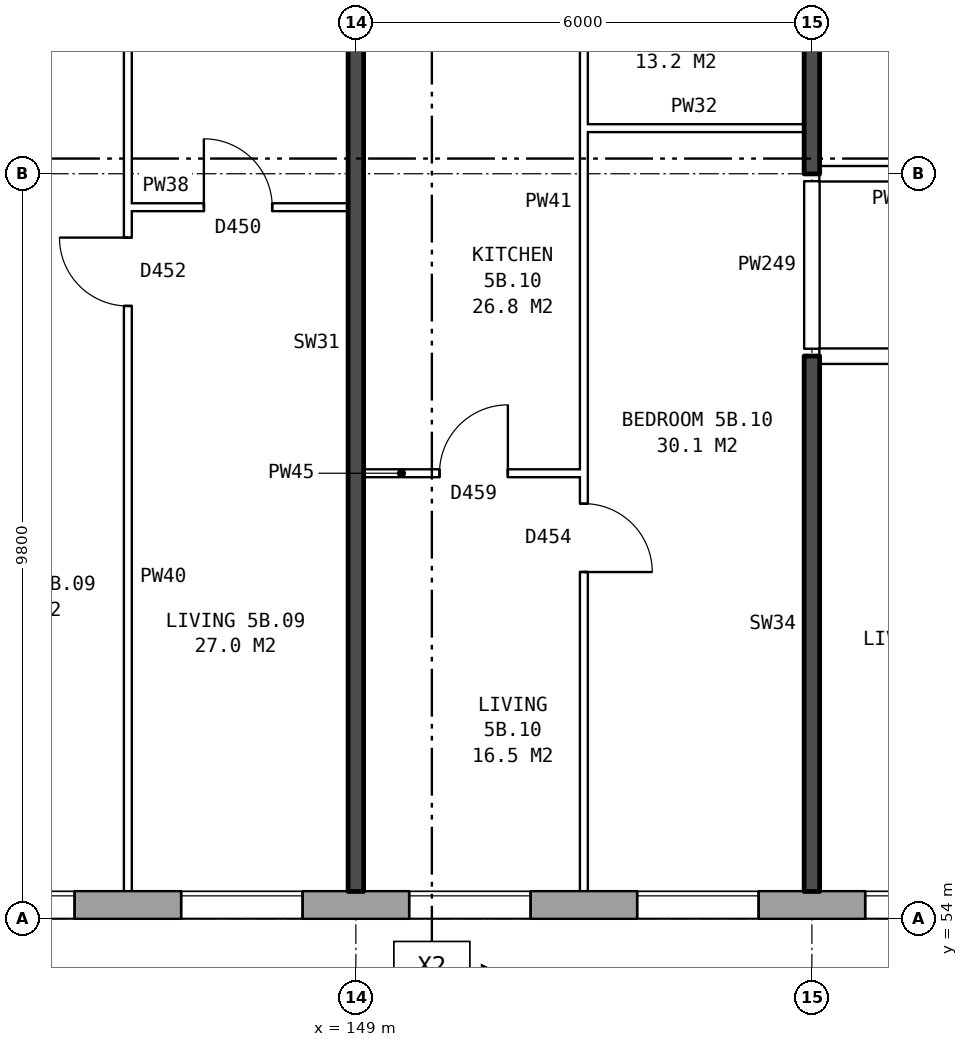
"""IFC4 building model, lengths in metres.
Left out: names, types, materials, properties, quantities, classifications, styles, units other than length and angle.
Written with IfcOpenShell. Run it as: python <this file> out.ifc"""

import sys

from ifc_helpers import new_model, si_unit, direction, frame, frame_2d, origin, place, context, subcontext, project, spatial, rectangle, extrude, element, fill, save


model = new_model("IFC4")
c1 = context("Model", 3, precision=1e-05, world=origin(), true_north=direction((0.0, 1.0)))
c2 = subcontext(c1, "Body", "Model", "MODEL_VIEW")
j1 = project(units=[si_unit("LENGTHUNIT", "METRE"), si_unit("PLANEANGLEUNIT", "RADIAN")], contexts=[c1])
p1 = place(None, origin())
s1 = spatial("IfcSite", under=j1, at=p1, CompositionType="ELEMENT")
p2 = place(p1, origin())
s2 = spatial("IfcBuilding", under=s1, at=p2, CompositionType="ELEMENT")
p3 = place(p2, frame((0.0, 0.0, 22.6)))
s3 = spatial("IfcBuildingStorey", under=s2, at=p3, CompositionType="ELEMENT", Elevation=22.6)
p4 = place(p3, frame((134.075, 54.18, 0.0), z_axis=(0.0, 0.0, 1.0), x_axis=(1.0, 0.0, 0.0)))
e1 = element("IfcWall", 1, at=p4, inside=s3, PredefinedType="STANDARD", context=c2, shape_type="SweptSolid", body=[
    extrude(rectangle(XDim=40.601, YDim=0.36, at=frame_2d((20.3, 0.0))), origin(), (0.0, 0.0, 1.0), 2.85),
])
p5 = place(p4, frame((0.3, 0.0, 0.8)))
e2 = element("IfcOpeningElement", 2, at=p5, cuts=e1, PredefinedType="OPENING", context=c2, shape_type="SweptSolid", body=[
    extrude(rectangle(XDim=1.4, YDim=1.8, at=frame_2d((0.7, 0.9))), frame((0.0, 0.19, 0.0), z_axis=(0.0, -1.0, 0.0), x_axis=(1.0, 0.0, 0.0)), (0.0, 0.0, 1.0), 0.38),
])
p6 = place(p4, frame((4.125, 0.0, 0.8)))
e3 = element("IfcOpeningElement", 3, at=p6, cuts=e1, PredefinedType="OPENING", context=c2, shape_type="SweptSolid", body=[
    extrude(rectangle(XDim=0.8, YDim=0.9, at=frame_2d((0.4, 0.45))), frame((0.0, 0.19, 0.0), z_axis=(0.0, -1.0, 0.0), x_axis=(1.0, 0.0, 0.0)), (0.0, 0.0, 1.0), 0.38),
])
p7 = place(p4, frame((6.625, 0.0, 0.8)))
e4 = element("IfcOpeningElement", 4, at=p7, cuts=e1, PredefinedType="OPENING", context=c2, shape_type="SweptSolid", body=[
    extrude(rectangle(XDim=1.6, YDim=1.8, at=frame_2d((0.8, 0.9))), frame((0.0, 0.19, 0.0), z_axis=(0.0, -1.0, 0.0), x_axis=(1.0, 0.0, 0.0)), (0.0, 0.0, 1.0), 0.38),
])
p8 = place(p4, frame((9.625, 0.0, 0.8)))
e5 = element("IfcOpeningElement", 5, at=p8, cuts=e1, PredefinedType="OPENING", context=c2, shape_type="SweptSolid", body=[
    extrude(rectangle(XDim=1.6, YDim=1.8, at=frame_2d((0.8, 0.9))), frame((0.0, 0.19, 0.0), z_axis=(0.0, -1.0, 0.0), x_axis=(1.0, 0.0, 0.0)), (0.0, 0.0, 1.0), 0.38),
])
p9 = place(p4, frame((12.625, 0.0, 0.8)))
e6 = element("IfcOpeningElement", 6, at=p9, cuts=e1, PredefinedType="OPENING", context=c2, shape_type="SweptSolid", body=[
    extrude(rectangle(XDim=1.6, YDim=1.8, at=frame_2d((0.8, 0.9))), frame((0.0, 0.19, 0.0), z_axis=(0.0, -1.0, 0.0), x_axis=(1.0, 0.0, 0.0)), (0.0, 0.0, 1.0), 0.38),
])
p10 = place(p4, frame((15.625, 0.0, 0.8)))
e7 = element("IfcOpeningElement", 7, at=p10, cuts=e1, PredefinedType="OPENING", context=c2, shape_type="SweptSolid", body=[
    extrude(rectangle(XDim=1.6, YDim=1.8, at=frame_2d((0.8, 0.9))), frame((0.0, 0.19, 0.0), z_axis=(0.0, -1.0, 0.0), x_axis=(1.0, 0.0, 0.0)), (0.0, 0.0, 1.0), 0.38),
])
p11 = place(p4, frame((18.625, 0.0, 0.8)))
e8 = element("IfcOpeningElement", 8, at=p11, cuts=e1, PredefinedType="OPENING", context=c2, shape_type="SweptSolid", body=[
    extrude(rectangle(XDim=1.6, YDim=1.8, at=frame_2d((0.8, 0.9))), frame((0.0, 0.19, 0.0), z_axis=(0.0, -1.0, 0.0), x_axis=(1.0, 0.0, 0.0)), (0.0, 0.0, 1.0), 0.38),
])
p12 = place(p4, frame((21.625, 0.0, 0.8)))
e9 = element("IfcOpeningElement", 9, at=p12, cuts=e1, PredefinedType="OPENING", context=c2, shape_type="SweptSolid", body=[
    extrude(rectangle(XDim=1.6, YDim=1.8, at=frame_2d((0.8, 0.9))), frame((0.0, 0.19, 0.0), z_axis=(0.0, -1.0, 0.0), x_axis=(1.0, 0.0, 0.0)), (0.0, 0.0, 1.0), 0.38),
])
p13 = place(p4, frame((24.625, 0.0, 0.8)))
e10 = element("IfcOpeningElement", 10, at=p13, cuts=e1, PredefinedType="OPENING", context=c2, shape_type="SweptSolid", body=[
    extrude(rectangle(XDim=1.6, YDim=1.8, at=frame_2d((0.8, 0.9))), frame((0.0, 0.19, 0.0), z_axis=(0.0, -1.0, 0.0), x_axis=(1.0, 0.0, 0.0)), (0.0, 0.0, 1.0), 0.38),
])
p14 = place(p4, frame((27.625, 0.0, 0.8)))
e11 = element("IfcOpeningElement", 11, at=p14, cuts=e1, PredefinedType="OPENING", context=c2, shape_type="SweptSolid", body=[
    extrude(rectangle(XDim=1.6, YDim=1.8, at=frame_2d((0.8, 0.9))), frame((0.0, 0.19, 0.0), z_axis=(0.0, -1.0, 0.0), x_axis=(1.0, 0.0, 0.0)), (0.0, 0.0, 1.0), 0.38),
])
p15 = place(p4, frame((30.625, 0.0, 0.8)))
e12 = element("IfcOpeningElement", 12, at=p15, cuts=e1, PredefinedType="OPENING", context=c2, shape_type="SweptSolid", body=[
    extrude(rectangle(XDim=1.6, YDim=1.8, at=frame_2d((0.8, 0.9))), frame((0.0, 0.19, 0.0), z_axis=(0.0, -1.0, 0.0), x_axis=(1.0, 0.0, 0.0)), (0.0, 0.0, 1.0), 0.38),
])
p16 = place(p4, frame((33.625, 0.0, 0.8)))
e13 = element("IfcOpeningElement", 13, at=p16, cuts=e1, PredefinedType="OPENING", context=c2, shape_type="SweptSolid", body=[
    extrude(rectangle(XDim=1.6, YDim=1.8, at=frame_2d((0.8, 0.9))), frame((0.0, 0.19, 0.0), z_axis=(0.0, -1.0, 0.0), x_axis=(1.0, 0.0, 0.0)), (0.0, 0.0, 1.0), 0.38),
])
p17 = place(p4, frame((35.525, 0.0, 0.8)))
e14 = element("IfcOpeningElement", 14, at=p17, cuts=e1, PredefinedType="OPENING", context=c2, shape_type="SweptSolid", body=[
    extrude(rectangle(XDim=0.6, YDim=1.2, at=frame_2d((0.3, 0.6))), frame((0.0, 0.19, 0.0), z_axis=(0.0, -1.0, 0.0), x_axis=(1.0, 0.0, 0.0)), (0.0, 0.0, 1.0), 0.38),
])
p18 = place(p4, frame((2.0, 0.0, 1.5)))
e15 = element("IfcOpeningElement", 15, at=p18, cuts=e1, PredefinedType="OPENING", context=c2, shape_type="SweptSolid", body=[
    extrude(rectangle(XDim=0.6, YDim=0.9, at=frame_2d((0.3, 0.45))), frame((0.0, 0.19, 0.0), z_axis=(0.0, -1.0, 0.0), x_axis=(1.0, 0.0, 0.0)), (0.0, 0.0, 1.0), 0.38),
])
p19 = place(p4, frame((5.225, 0.0, 0.8)))
e16 = element("IfcOpeningElement", 16, at=p19, cuts=e1, PredefinedType="OPENING", context=c2, shape_type="SweptSolid", body=[
    extrude(rectangle(XDim=1.0, YDim=1.8, at=frame_2d((0.5, 0.9))), frame((0.0, 0.19, 0.0), z_axis=(0.0, -1.0, 0.0), x_axis=(1.0, 0.0, 0.0)), (0.0, 0.0, 1.0), 0.38),
])
p20 = place(p4, frame((37.725, 0.0, 1.7)))
e17 = element("IfcOpeningElement", 17, at=p20, cuts=e1, PredefinedType="OPENING", context=c2, shape_type="SweptSolid", body=[
    extrude(rectangle(XDim=1.0, YDim=0.9, at=frame_2d((0.5, 0.45))), frame((0.0, 0.19, 0.0), z_axis=(0.0, -1.0, 0.0), x_axis=(1.0, 0.0, 0.0)), (0.0, 0.0, 1.0), 0.38),
])
p21 = place(p3, frame((149.1, 59.86, 0.0), z_axis=(0.0, 0.0, 1.0), x_axis=(1.0, 0.0, 0.0)))
e18 = element("IfcWall", 18, at=p21, inside=s3, PredefinedType="PARTITIONING", context=c2, shape_type="SweptSolid", body=[
    extrude(rectangle(XDim=2.9, YDim=0.1, at=frame_2d((1.45, 0.0))), origin(), (0.0, 0.0, 1.0), 2.85),
])
p22 = place(p21, frame((1.0, 0.0, 0.0)))
e19 = element("IfcOpeningElement", 19, at=p22, cuts=e18, PredefinedType="OPENING", context=c2, shape_type="SweptSolid", body=[
    extrude(rectangle(XDim=0.9, YDim=2.1, at=frame_2d((0.45, 1.05))), frame((0.0, 0.06, 0.0), z_axis=(0.0, -1.0, 0.0), x_axis=(1.0, 0.0, 0.0)), (0.0, 0.0, 1.0), 0.12),
])
p23 = place(p3, frame((155.1, 61.4, 0.0), z_axis=(0.0, 0.0, 1.0), x_axis=(1.0, 0.0, 0.0)))
e20 = element("IfcWall", 20, at=p23, inside=s3, PredefinedType="PARTITIONING", context=c2, shape_type="SweptSolid", body=[
    extrude(rectangle(XDim=22.29, YDim=0.2, at=frame_2d((11.145, 0.0))), origin(), (0.0, 0.0, 1.0), 2.85),
])
p24 = place(p23, frame((2.45, 0.0, 0.0)))
e21 = element("IfcOpeningElement", 21, at=p24, cuts=e20, PredefinedType="OPENING", context=c2, shape_type="SweptSolid", body=[
    extrude(rectangle(XDim=1.0, YDim=2.1, at=frame_2d((0.5, 1.05))), frame((0.0, 0.11, 0.0), z_axis=(0.0, -1.0, 0.0), x_axis=(1.0, 0.0, 0.0)), (0.0, 0.0, 1.0), 0.22),
])
p25 = place(p23, frame((14.4, 0.0, 0.0)))
e22 = element("IfcOpeningElement", 22, at=p25, cuts=e20, PredefinedType="OPENING", context=c2, shape_type="SweptSolid", body=[
    extrude(rectangle(XDim=1.0, YDim=2.1, at=frame_2d((0.5, 1.05))), frame((0.0, 0.11, 0.0), z_axis=(0.0, -1.0, 0.0), x_axis=(1.0, 0.0, 0.0)), (0.0, 0.0, 1.0), 0.22),
])
p26 = place(p3, frame((146.0, 63.36, 0.0), z_axis=(0.0, 0.0, 1.0), x_axis=(1.0, 0.0, 0.0)))
e23 = element("IfcWall", 23, at=p26, inside=s3, PredefinedType="PARTITIONING", context=c2, shape_type="SweptSolid", body=[
    extrude(rectangle(XDim=2.9, YDim=0.1, at=frame_2d((1.45, 0.0))), origin(), (0.0, 0.0, 1.0), 2.85),
])
p27 = place(p26, frame((1.0, 0.0, 0.0)))
e24 = element("IfcOpeningElement", 24, at=p27, cuts=e23, PredefinedType="OPENING", context=c2, shape_type="SweptSolid", body=[
    extrude(rectangle(XDim=0.9, YDim=2.1, at=frame_2d((0.45, 1.05))), frame((0.0, 0.06, 0.0), z_axis=(0.0, -1.0, 0.0), x_axis=(1.0, 0.0, 0.0)), (0.0, 0.0, 1.0), 0.12),
])
p28 = place(p3, frame((155.1, 63.8, 0.0), z_axis=(0.0, 0.0, 1.0), x_axis=(1.0, 0.0, 0.0)))
e25 = element("IfcWall", 25, at=p28, inside=s3, PredefinedType="PARTITIONING", context=c2, shape_type="SweptSolid", body=[
    extrude(rectangle(XDim=2.14, YDim=0.2, at=frame_2d((1.07, 0.0))), origin(), (0.0, 0.0, 1.0), 2.85),
])
p29 = place(p3, frame((152.0, 64.4, 0.0), z_axis=(0.0, 0.0, 1.0), x_axis=(1.0, 0.0, 0.0)))
e26 = element("IfcWall", 26, at=p29, inside=s3, PredefinedType="PARTITIONING", context=c2, shape_type="SweptSolid", body=[
    extrude(rectangle(XDim=2.9, YDim=0.1, at=frame_2d((1.45, 0.0))), origin(), (0.0, 0.0, 1.0), 2.85),
])
p30 = place(p3, frame((146.0, 54.36, 0.0), z_axis=(0.0, 0.0, 1.0), x_axis=(0.0, 1.0, 0.0)))
e27 = element("IfcWall", 27, at=p30, inside=s3, PredefinedType="PARTITIONING", context=c2, shape_type="SweptSolid", body=[
    extrude(rectangle(XDim=14.34, YDim=0.1, at=frame_2d((7.17, 0.0))), origin(), (0.0, 0.0, 1.0), 2.85),
])
p31 = place(p30, frame((7.7, 0.0, 0.0)))
e28 = element("IfcOpeningElement", 28, at=p31, cuts=e27, PredefinedType="OPENING", context=c2, shape_type="SweptSolid", body=[
    extrude(rectangle(XDim=0.9, YDim=2.1, at=frame_2d((0.45, 1.05))), frame((0.0, 0.06, 0.0), z_axis=(0.0, -1.0, 0.0), x_axis=(1.0, 0.0, 0.0)), (0.0, 0.0, 1.0), 0.12),
])
p32 = place(p30, frame((13.04, 0.0, 0.0)))
e29 = element("IfcOpeningElement", 29, at=p32, cuts=e27, PredefinedType="OPENING", context=c2, shape_type="SweptSolid", body=[
    extrude(rectangle(XDim=0.9, YDim=2.1, at=frame_2d((0.45, 1.05))), frame((0.0, 0.06, 0.0), z_axis=(0.0, -1.0, 0.0), x_axis=(1.0, 0.0, 0.0)), (0.0, 0.0, 1.0), 0.12),
])
p33 = place(p3, frame((149.0, 54.36, 0.0), z_axis=(0.0, 0.0, 1.0), x_axis=(0.0, 1.0, 0.0)))
e30 = element("IfcWall", 30, at=p33, inside=s3, PredefinedType="SOLIDWALL", context=c2, shape_type="SweptSolid", body=[
    extrude(rectangle(XDim=14.44, YDim=0.2, at=frame_2d((7.22, 0.0))), origin(), (0.0, 0.0, 1.0), 2.85),
])
p34 = place(p3, frame((152.0, 54.36, 0.0), z_axis=(0.0, 0.0, 1.0), x_axis=(0.0, 1.0, 0.0)))
e31 = element("IfcWall", 31, at=p34, inside=s3, PredefinedType="PARTITIONING", context=c2, shape_type="SweptSolid", body=[
    extrude(rectangle(XDim=14.34, YDim=0.1, at=frame_2d((7.17, 0.0))), origin(), (0.0, 0.0, 1.0), 2.85),
])
p35 = place(p34, frame((4.2, 0.0, 0.0)))
e32 = element("IfcOpeningElement", 32, at=p35, cuts=e31, PredefinedType="OPENING", context=c2, shape_type="SweptSolid", body=[
    extrude(rectangle(XDim=0.9, YDim=2.1, at=frame_2d((0.45, 1.05))), frame((0.0, 0.06, 0.0), z_axis=(0.0, -1.0, 0.0), x_axis=(1.0, 0.0, 0.0)), (0.0, 0.0, 1.0), 0.12),
])
p36 = place(p34, frame((13.04, 0.0, 0.0)))
e33 = element("IfcOpeningElement", 33, at=p36, cuts=e31, PredefinedType="OPENING", context=c2, shape_type="SweptSolid", body=[
    extrude(rectangle(XDim=0.9, YDim=2.1, at=frame_2d((0.45, 1.05))), frame((0.0, 0.06, 0.0), z_axis=(0.0, -1.0, 0.0), x_axis=(1.0, 0.0, 0.0)), (0.0, 0.0, 1.0), 0.12),
])
p37 = place(p3, frame((155.0, 54.36, 0.0), z_axis=(0.0, 0.0, 1.0), x_axis=(0.0, 1.0, 0.0)))
e34 = element("IfcWall", 34, at=p37, inside=s3, PredefinedType="SOLIDWALL", context=c2, shape_type="SweptSolid", body=[
    extrude(rectangle(XDim=7.04, YDim=0.2, at=frame_2d((3.52, 0.0))), origin(), (0.0, 0.0, 1.0), 2.85),
])
p38 = place(p3, frame((155.0, 61.5, 0.0), z_axis=(0.0, 0.0, 1.0), x_axis=(0.0, 1.0, 0.0)))
e35 = element("IfcWall", 35, at=p38, inside=s3, PredefinedType="PARTITIONING", context=c2, shape_type="SweptSolid", body=[
    extrude(rectangle(XDim=2.2, YDim=0.2, at=frame_2d((1.1, 0.0))), origin(), (0.0, 0.0, 1.0), 2.85),
])
p39 = place(p3, frame((155.0, 63.8, 0.0), z_axis=(0.0, 0.0, 1.0), x_axis=(0.0, 1.0, 0.0)))
e36 = element("IfcWall", 36, at=p39, inside=s3, PredefinedType="SOLIDWALL", context=c2, shape_type="SweptSolid", body=[
    extrude(rectangle(XDim=5.0, YDim=0.2, at=frame_2d((2.5, 0.0))), origin(), (0.0, 0.0, 1.0), 2.85),
])
p40 = place(p8, origin())
e37 = element("IfcWindow", 37, at=p40, inside=s3, PartitioningType="SINGLE_PANEL", PredefinedType="WINDOW", context=c2, shape_type="SweptSolid", body=[
    extrude(rectangle(XDim=1.6, YDim=1.8, at=frame_2d((0.8, 0.9))), frame((0.0, 0.15, 0.0), z_axis=(0.0, -1.0, 0.0), x_axis=(1.0, 0.0, 0.0)), (0.0, 0.0, 1.0), 0.06),
])
fill(e5, e37)
p41 = place(p9, origin())
e38 = element("IfcWindow", 38, at=p41, inside=s3, PartitioningType="SINGLE_PANEL", PredefinedType="WINDOW", context=c2, shape_type="SweptSolid", body=[
    extrude(rectangle(XDim=1.6, YDim=1.8, at=frame_2d((0.8, 0.9))), frame((0.0, 0.15, 0.0), z_axis=(0.0, -1.0, 0.0), x_axis=(1.0, 0.0, 0.0)), (0.0, 0.0, 1.0), 0.06),
])
fill(e6, e38)
p42 = place(p10, origin())
e39 = element("IfcWindow", 39, at=p42, inside=s3, PartitioningType="SINGLE_PANEL", PredefinedType="WINDOW", context=c2, shape_type="SweptSolid", body=[
    extrude(rectangle(XDim=1.6, YDim=1.8, at=frame_2d((0.8, 0.9))), frame((0.0, 0.15, 0.0), z_axis=(0.0, -1.0, 0.0), x_axis=(1.0, 0.0, 0.0)), (0.0, 0.0, 1.0), 0.06),
])
fill(e7, e39)
p43 = place(p11, origin())
e40 = element("IfcWindow", 40, at=p43, inside=s3, PartitioningType="SINGLE_PANEL", PredefinedType="WINDOW", context=c2, shape_type="SweptSolid", body=[
    extrude(rectangle(XDim=1.6, YDim=1.8, at=frame_2d((0.8, 0.9))), frame((0.0, 0.15, 0.0), z_axis=(0.0, -1.0, 0.0), x_axis=(1.0, 0.0, 0.0)), (0.0, 0.0, 1.0), 0.06),
])
fill(e8, e40)
p44 = place(p12, origin())
e41 = element("IfcWindow", 41, at=p44, inside=s3, PartitioningType="SINGLE_PANEL", PredefinedType="WINDOW", context=c2, shape_type="SweptSolid", body=[
    extrude(rectangle(XDim=1.6, YDim=1.8, at=frame_2d((0.8, 0.9))), frame((0.0, 0.15, 0.0), z_axis=(0.0, -1.0, 0.0), x_axis=(1.0, 0.0, 0.0)), (0.0, 0.0, 1.0), 0.06),
])
fill(e9, e41)
p45 = place(p31, origin())
e42 = element("IfcDoor", 42, at=p45, inside=s3, OperationType="SINGLE_SWING_RIGHT", PredefinedType="DOOR", context=c2, shape_type="SweptSolid", body=[
    extrude(rectangle(XDim=0.9, YDim=2.1, at=frame_2d((0.45, 1.05))), frame((0.0, 0.025, 0.0), z_axis=(0.0, -1.0, 0.0), x_axis=(1.0, 0.0, 0.0)), (0.0, 0.0, 1.0), 0.05),
])
fill(e28, e42)
p46 = place(p27, origin())
e43 = element("IfcDoor", 43, at=p46, inside=s3, OperationType="SINGLE_SWING_LEFT", PredefinedType="DOOR", context=c2, shape_type="SweptSolid", body=[
    extrude(rectangle(XDim=0.9, YDim=2.1, at=frame_2d((0.45, 1.05))), frame((0.0, 0.025, 0.0), z_axis=(0.0, -1.0, 0.0), x_axis=(1.0, 0.0, 0.0)), (0.0, 0.0, 1.0), 0.05),
])
fill(e24, e43)
p47 = place(p35, frame((0.9, 0.0, 0.0), z_axis=(0.0, 0.0, 1.0), x_axis=(-1.0, 0.0, 0.0)))
e44 = element("IfcDoor", 44, at=p47, inside=s3, OperationType="SINGLE_SWING_RIGHT", PredefinedType="DOOR", context=c2, shape_type="SweptSolid", body=[
    extrude(rectangle(XDim=0.9, YDim=2.1, at=frame_2d((0.45, 1.05))), frame((0.0, 0.025, 0.0), z_axis=(0.0, -1.0, 0.0), x_axis=(1.0, 0.0, 0.0)), (0.0, 0.0, 1.0), 0.05),
])
fill(e32, e44)
p48 = place(p22, origin())
e45 = element("IfcDoor", 45, at=p48, inside=s3, OperationType="SINGLE_SWING_RIGHT", PredefinedType="DOOR", context=c2, shape_type="SweptSolid", body=[
    extrude(rectangle(XDim=0.9, YDim=2.1, at=frame_2d((0.45, 1.05))), frame((0.0, 0.025, 0.0), z_axis=(0.0, -1.0, 0.0), x_axis=(1.0, 0.0, 0.0)), (0.0, 0.0, 1.0), 0.05),
])
fill(e19, e45)
save(model, sys.argv[1])
